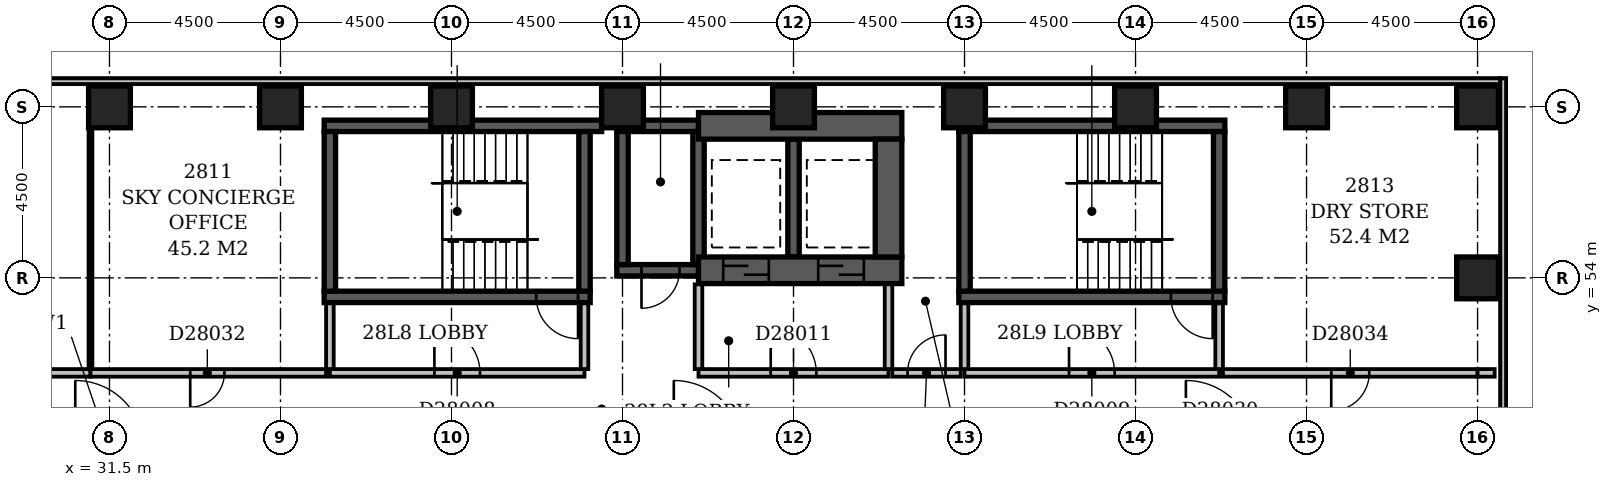
"""IFC4 building model, lengths in metres.
Left out: names, types, materials, properties, quantities, classifications, styles, units other than length and angle.
Written with IfcOpenShell. Run it as: python <this file> out.ifc"""

import sys

from ifc_helpers import new_model, si_unit, direction, frame, frame_2d, origin, origin_2d, place, context, subcontext, project, spatial, rectangle, extrude, element, fill, save


model = new_model("IFC4")
c1 = context("Model", 3, precision=1e-05, world=origin(), true_north=direction((0.0, 1.0)))
c2 = subcontext(c1, "Body", "Model", "MODEL_VIEW")
j1 = project(units=[si_unit("LENGTHUNIT", "METRE"), si_unit("PLANEANGLEUNIT", "RADIAN")], contexts=[c1])
p1 = place(None, origin())
s1 = spatial("IfcSite", under=j1, at=p1, CompositionType="ELEMENT")
p2 = place(p1, origin())
s2 = spatial("IfcBuilding", under=s1, at=p2, CompositionType="ELEMENT")
p3 = place(p2, frame((0.0, 0.0, 113.6)))
s3 = spatial("IfcBuildingStorey", under=s2, at=p3, CompositionType="ELEMENT", Elevation=113.6)
p4 = place(p3, frame((37.15, 53.5, -0.5), z_axis=(0.0, 0.0, 1.0), x_axis=(1.0, 0.0, 0.0)))
e1 = element("IfcWall", 1, at=p4, inside=s3, PredefinedType="SHEAR", context=c2, shape_type="SweptSolid", body=[
    extrude(rectangle(XDim=7.0, YDim=0.3, at=frame_2d((3.5, 0.0))), origin(), (0.0, 0.0, 1.0), 6.2),
])
p5 = place(p4, frame((5.58, 0.0, 0.5)))
e2 = element("IfcOpeningElement", 2, at=p5, cuts=e1, PredefinedType="OPENING", context=c2, shape_type="SweptSolid", body=[
    extrude(rectangle(XDim=1.1, YDim=2.1, at=frame_2d((0.55, 1.05))), frame((0.0, 0.162, 0.0), z_axis=(0.0, -1.0, 0.0), x_axis=(1.0, 0.0, 0.0)), (0.0, 0.0, 1.0), 0.324),
])
p6 = place(p3, frame((37.15, 58.0, -0.5), z_axis=(0.0, 0.0, 1.0), x_axis=(1.0, 0.0, 0.0)))
e3 = element("IfcWall", 3, at=p6, inside=s3, PredefinedType="SHEAR", context=c2, shape_type="SweptSolid", body=[
    extrude(rectangle(XDim=7.3, YDim=0.3, at=frame_2d((3.65, 0.0))), origin(), (0.0, 0.0, 1.0), 6.2),
])
for number, where, z_axis, x_axis in (
    (4, (37.3, 53.65, -0.5), (0.0, 0.0, 1.0), (0.0, 1.0, 0.0)),
    (5, (44.0, 53.65, -0.5), (0.0, 0.0, 1.0), (0.0, 1.0, 0.0)),
):
    element("IfcWall", number, at=place(p3, frame(where, z_axis=z_axis, x_axis=x_axis)), inside=s3, PredefinedType="SHEAR", context=c2, shape_type="SweptSolid", body=[
        extrude(rectangle(XDim=4.2, YDim=0.3, at=frame_2d((2.1, 0.0))), origin(), (0.0, 0.0, 1.0), 6.2),
    ])
p7 = place(p3, frame((44.85, 54.2, -0.5), z_axis=(0.0, 0.0, 1.0), x_axis=(1.0, 0.0, 0.0)))
e6 = element("IfcWall", 6, at=p7, inside=s3, PredefinedType="SHEAR", context=c2, shape_type="SweptSolid", body=[
    extrude(rectangle(XDim=2.15, YDim=0.3, at=frame_2d((1.075, 0.0))), origin(), (0.0, 0.0, 1.0), 6.2),
])
p8 = place(p7, frame((0.65, 0.0, 0.5)))
e7 = element("IfcOpeningElement", 7, at=p8, cuts=e6, PredefinedType="OPENING", context=c2, shape_type="SweptSolid", body=[
    extrude(rectangle(XDim=1.0, YDim=2.1, at=frame_2d((0.5, 1.05))), frame((0.0, 0.162, 0.0), z_axis=(0.0, -1.0, 0.0), x_axis=(1.0, 0.0, 0.0)), (0.0, 0.0, 1.0), 0.324),
])
p9 = place(p3, frame((44.85, 58.0, -0.5), z_axis=(0.0, 0.0, 1.0), x_axis=(1.0, 0.0, 0.0)))
e8 = element("IfcWall", 8, at=p9, inside=s3, PredefinedType="SHEAR", context=c2, shape_type="SweptSolid", body=[
    extrude(rectangle(XDim=2.15, YDim=0.3, at=frame_2d((1.075, 0.0))), origin(), (0.0, 0.0, 1.0), 6.2),
])
p10 = place(p3, frame((45.0, 54.35, -0.5), z_axis=(0.0, 0.0, 1.0), x_axis=(0.0, 1.0, 0.0)))
e9 = element("IfcWall", 9, at=p10, inside=s3, PredefinedType="SHEAR", context=c2, shape_type="SweptSolid", body=[
    extrude(rectangle(XDim=3.5, YDim=0.3, at=frame_2d((1.75, 0.0))), origin(), (0.0, 0.0, 1.0), 6.2),
])
p11 = place(p3, frame((47.0, 54.2, -0.5), z_axis=(0.0, 0.0, 1.0), x_axis=(1.0, 0.0, 0.0)))
e10 = element("IfcWall", 10, at=p11, inside=s3, PredefinedType="SHEAR", context=c2, shape_type="SweptSolid", body=[
    extrude(rectangle(XDim=5.35, YDim=0.7, at=frame_2d((2.675, 0.0))), origin(), (0.0, 0.0, 1.0), 6.2),
])
p12 = place(p11, frame((0.65, 0.0, 0.5)))
e11 = element("IfcOpeningElement", 11, at=p12, cuts=e10, PredefinedType="OPENING", context=c2, shape_type="SweptSolid", body=[
    extrude(rectangle(XDim=1.2, YDim=2.1, at=frame_2d((0.6, 1.05))), frame((0.0, 0.362, 0.0), z_axis=(0.0, -1.0, 0.0), x_axis=(1.0, 0.0, 0.0)), (0.0, 0.0, 1.0), 0.724),
])
p13 = place(p11, frame((3.15, 0.0, 0.5)))
e12 = element("IfcOpeningElement", 12, at=p13, cuts=e10, PredefinedType="OPENING", context=c2, shape_type="SweptSolid", body=[
    extrude(rectangle(XDim=1.2, YDim=2.1, at=frame_2d((0.6, 1.05))), frame((0.0, 0.362, 0.0), z_axis=(0.0, -1.0, 0.0), x_axis=(1.0, 0.0, 0.0)), (0.0, 0.0, 1.0), 0.724),
])
p14 = place(p3, frame((47.0, 54.35, -0.5), z_axis=(0.0, 0.0, 1.0), x_axis=(0.0, 1.0, 0.0)))
e13 = element("IfcWall", 13, at=p14, inside=s3, PredefinedType="SHEAR", context=c2, shape_type="SweptSolid", body=[
    extrude(rectangle(XDim=3.5, YDim=0.3, at=frame_2d((1.75, 0.0))), origin(), (0.0, 0.0, 1.0), 6.2),
])
p15 = place(p3, frame((47.0, 58.0, -0.5), z_axis=(0.0, 0.0, 1.0), x_axis=(1.0, 0.0, 0.0)))
e14 = element("IfcWall", 14, at=p15, inside=s3, PredefinedType="SHEAR", context=c2, shape_type="SweptSolid", body=[
    extrude(rectangle(XDim=5.35, YDim=0.7, at=frame_2d((2.675, 0.0))), origin(), (0.0, 0.0, 1.0), 6.2),
])
p16 = place(p3, frame((49.5, 54.55, -0.5), z_axis=(0.0, 0.0, 1.0), x_axis=(0.0, 1.0, 0.0)))
e15 = element("IfcWall", 15, at=p16, inside=s3, PredefinedType="SHEAR", context=c2, shape_type="SweptSolid", body=[
    extrude(rectangle(XDim=3.1, YDim=0.3, at=frame_2d((1.55, 0.0))), origin(), (0.0, 0.0, 1.0), 6.2),
])
p17 = place(p3, frame((52.0, 54.55, -0.5), z_axis=(0.0, 0.0, 1.0), x_axis=(0.0, 1.0, 0.0)))
e16 = element("IfcWall", 16, at=p17, inside=s3, PredefinedType="SHEAR", context=c2, shape_type="SweptSolid", body=[
    extrude(rectangle(XDim=3.1, YDim=0.7, at=frame_2d((1.55, 0.0))), origin(), (0.0, 0.0, 1.0), 6.2),
])
p18 = place(p3, frame((53.85, 53.5, -0.5), z_axis=(0.0, 0.0, 1.0), x_axis=(1.0, 0.0, 0.0)))
e17 = element("IfcWall", 17, at=p18, inside=s3, PredefinedType="SHEAR", context=c2, shape_type="SweptSolid", body=[
    extrude(rectangle(XDim=7.0, YDim=0.3, at=frame_2d((3.5, 0.0))), origin(), (0.0, 0.0, 1.0), 6.2),
])
p19 = place(p18, frame((5.58, 0.0, 0.5)))
e18 = element("IfcOpeningElement", 18, at=p19, cuts=e17, PredefinedType="OPENING", context=c2, shape_type="SweptSolid", body=[
    extrude(rectangle(XDim=1.1, YDim=2.1, at=frame_2d((0.55, 1.05))), frame((0.0, 0.162, 0.0), z_axis=(0.0, -1.0, 0.0), x_axis=(1.0, 0.0, 0.0)), (0.0, 0.0, 1.0), 0.324),
])
p20 = place(p3, frame((53.85, 58.0, -0.5), z_axis=(0.0, 0.0, 1.0), x_axis=(1.0, 0.0, 0.0)))
e19 = element("IfcWall", 19, at=p20, inside=s3, PredefinedType="SHEAR", context=c2, shape_type="SweptSolid", body=[
    extrude(rectangle(XDim=7.0, YDim=0.3, at=frame_2d((3.5, 0.0))), origin(), (0.0, 0.0, 1.0), 6.2),
])
for number, where, z_axis, x_axis in (
    (20, (54.0, 53.65, -0.5), (0.0, 0.0, 1.0), (0.0, 1.0, 0.0)),
    (21, (60.7, 53.65, -0.5), (0.0, 0.0, 1.0), (0.0, 1.0, 0.0)),
):
    element("IfcWall", number, at=place(p3, frame(where, z_axis=z_axis, x_axis=x_axis)), inside=s3, PredefinedType="SHEAR", context=c2, shape_type="SweptSolid", body=[
        extrude(rectangle(XDim=4.2, YDim=0.3, at=frame_2d((2.1, 0.0))), origin(), (0.0, 0.0, 1.0), 6.2),
    ])
for number, where, z_axis, x_axis in (
    (22, (67.5, 54.0, -0.5), (0.0, 0.0, 1.0), (1.0, 0.0, 0.0)),
    (23, (31.5, 58.5, -0.5), (0.0, 0.0, 1.0), (1.0, 0.0, 0.0)),
    (24, (36.0, 58.5, -0.5), (0.0, 0.0, 1.0), (1.0, 0.0, 0.0)),
    (25, (40.5, 58.5, -0.5), (0.0, 0.0, 1.0), (1.0, 0.0, 0.0)),
    (26, (45.0, 58.5, -0.5), (0.0, 0.0, 1.0), (1.0, 0.0, 0.0)),
    (27, (49.5, 58.5, -0.5), (0.0, 0.0, 1.0), (1.0, 0.0, 0.0)),
    (28, (54.0, 58.5, -0.5), (0.0, 0.0, 1.0), (1.0, 0.0, 0.0)),
    (29, (58.5, 58.5, -0.5), (0.0, 0.0, 1.0), (1.0, 0.0, 0.0)),
    (30, (63.0, 58.5, -0.5), (0.0, 0.0, 1.0), (1.0, 0.0, 0.0)),
    (31, (67.5, 58.5, -0.5), (0.0, 0.0, 1.0), (1.0, 0.0, 0.0)),
):
    element("IfcColumn", number, at=place(p3, frame(where, z_axis=z_axis, x_axis=x_axis)), inside=s3, PredefinedType="COLUMN", context=c2, shape_type="SweptSolid", body=[
        extrude(rectangle(XDim=1.1, YDim=1.1, at=origin_2d()), origin(), (0.0, 0.0, 1.0), 6.2),
    ])
p21 = place(p3, frame((68.175, 35.4, 0.0), z_axis=(0.0, 0.0, 1.0), x_axis=(0.0, 1.0, 0.0)))
e32 = element("IfcWall", 32, at=p21, inside=s3, PredefinedType="STANDARD", context=c2, shape_type="SweptSolid", body=[
    extrude(rectangle(XDim=23.85, YDim=0.15, at=frame_2d((11.925, 0.0))), origin(), (0.0, 0.0, 1.0), 1.1),
])
p22 = place(p3, frame((68.1, 59.175, 0.0), z_axis=(0.0, 0.0, 1.0), x_axis=(-1.0, 0.0, 0.0)))
e33 = element("IfcWall", 33, at=p22, inside=s3, PredefinedType="STANDARD", context=c2, shape_type="SweptSolid", body=[
    extrude(rectangle(XDim=68.85, YDim=0.15, at=frame_2d((34.425, 0.0))), origin(), (0.0, 0.0, 1.0), 1.1),
])
p23 = place(p3, frame((68.175, 46.887, 1.1), z_axis=(0.0, 0.0, 1.0), x_axis=(0.0, 1.0, 0.0)))
e34 = element("IfcWall", 34, at=p23, inside=s3, PredefinedType="STANDARD", context=c2, shape_type="SweptSolid", body=[
    extrude(rectangle(XDim=12.363, YDim=0.15, at=frame_2d((6.181, 0.0))), origin(), (0.0, 0.0, 1.0), 4.0),
])
p24 = place(p3, frame((68.1, 59.175, 1.1), z_axis=(0.0, 0.0, 1.0), x_axis=(-1.0, 0.0, 0.0)))
e35 = element("IfcWall", 35, at=p24, inside=s3, PredefinedType="STANDARD", context=c2, shape_type="SweptSolid", body=[
    extrude(rectangle(XDim=68.85, YDim=0.15, at=frame_2d((34.425, 0.0))), origin(), (0.0, 0.0, 1.0), 4.0),
])
p25 = place(p3, frame((47.0, 51.5, 0.0), z_axis=(0.0, 0.0, 1.0), x_axis=(1.0, 0.0, 0.0)))
e36 = element("IfcWall", 36, at=p25, inside=s3, PredefinedType="PARTITIONING", context=c2, shape_type="SweptSolid", body=[
    extrude(rectangle(XDim=5.0, YDim=0.2, at=frame_2d((2.5, 0.0))), origin(), (0.0, 0.0, 1.0), 5.7),
])
p26 = place(p25, frame((1.9, 0.0, 0.0)))
e37 = element("IfcOpeningElement", 37, at=p26, cuts=e36, PredefinedType="OPENING", context=c2, shape_type="SweptSolid", body=[
    extrude(rectangle(XDim=1.2, YDim=2.1, at=frame_2d((0.6, 1.05))), frame((0.0, 0.112, 0.0), z_axis=(0.0, -1.0, 0.0), x_axis=(1.0, 0.0, 0.0)), (0.0, 0.0, 1.0), 0.224),
])
for number, where, z_axis, x_axis in (
    (38, (52.0, 51.6, 0.0), (0.0, 0.0, 1.0), (0.0, 1.0, 0.0)),
    (39, (47.0, 51.6, 0.0), (0.0, 0.0, 1.0), (0.0, 1.0, 0.0)),
):
    element("IfcWall", number, at=place(p3, frame(where, z_axis=z_axis, x_axis=x_axis)), inside=s3, PredefinedType="PARTITIONING", context=c2, shape_type="SweptSolid", body=[
        extrude(rectangle(XDim=2.23, YDim=0.2, at=frame_2d((1.115, 0.0))), origin(), (0.0, 0.0, 1.0), 5.7),
    ])
p27 = place(p3, frame((37.3, 51.5, 0.0), z_axis=(0.0, 0.0, 1.0), x_axis=(1.0, 0.0, 0.0)))
e40 = element("IfcWall", 40, at=p27, inside=s3, PredefinedType="PARTITIONING", context=c2, shape_type="SweptSolid", body=[
    extrude(rectangle(XDim=6.7, YDim=0.2, at=frame_2d((3.35, 0.0))), origin(), (0.0, 0.0, 1.0), 5.7),
])
p28 = place(p27, frame((2.75, 0.0, 0.0)))
e41 = element("IfcOpeningElement", 41, at=p28, cuts=e40, PredefinedType="OPENING", context=c2, shape_type="SweptSolid", body=[
    extrude(rectangle(XDim=1.2, YDim=2.1, at=frame_2d((0.6, 1.05))), frame((0.0, 0.112, 0.0), z_axis=(0.0, -1.0, 0.0), x_axis=(1.0, 0.0, 0.0)), (0.0, 0.0, 1.0), 0.224),
])
for number, where, z_axis, x_axis in (
    (42, (44.0, 51.6, 0.0), (0.0, 0.0, 1.0), (0.0, 1.0, 0.0)),
    (43, (37.3, 51.6, 0.0), (0.0, 0.0, 1.0), (0.0, 1.0, 0.0)),
):
    element("IfcWall", number, at=place(p3, frame(where, z_axis=z_axis, x_axis=x_axis)), inside=s3, PredefinedType="PARTITIONING", context=c2, shape_type="SweptSolid", body=[
        extrude(rectangle(XDim=1.73, YDim=0.2, at=frame_2d((0.865, 0.0))), origin(), (0.0, 0.0, 1.0), 5.7),
    ])
p29 = place(p3, frame((54.0, 51.5, 0.0), z_axis=(0.0, 0.0, 1.0), x_axis=(1.0, 0.0, 0.0)))
e44 = element("IfcWall", 44, at=p29, inside=s3, PredefinedType="PARTITIONING", context=c2, shape_type="SweptSolid", body=[
    extrude(rectangle(XDim=6.7, YDim=0.2, at=frame_2d((3.35, 0.0))), origin(), (0.0, 0.0, 1.0), 5.7),
])
p30 = place(p29, frame((2.75, 0.0, 0.0)))
e45 = element("IfcOpeningElement", 45, at=p30, cuts=e44, PredefinedType="OPENING", context=c2, shape_type="SweptSolid", body=[
    extrude(rectangle(XDim=1.2, YDim=2.1, at=frame_2d((0.6, 1.05))), frame((0.0, 0.112, 0.0), z_axis=(0.0, -1.0, 0.0), x_axis=(1.0, 0.0, 0.0)), (0.0, 0.0, 1.0), 0.224),
])
p31 = place(p3, frame((60.7, 51.6, 0.0), z_axis=(0.0, 0.0, 1.0), x_axis=(0.0, 1.0, 0.0)))
e46 = element("IfcWall", 46, at=p31, inside=s3, PredefinedType="PARTITIONING", context=c2, shape_type="SweptSolid", body=[
    extrude(rectangle(XDim=1.73, YDim=0.2, at=frame_2d((0.865, 0.0))), origin(), (0.0, 0.0, 1.0), 5.7),
])
p32 = place(p3, frame((54.0, 51.6, 0.0), z_axis=(0.0, 0.0, 1.0), x_axis=(0.0, 1.0, 0.0)))
e47 = element("IfcWall", 47, at=p32, inside=s3, PredefinedType="PARTITIONING", context=c2, shape_type="SweptSolid", body=[
    extrude(rectangle(XDim=1.73, YDim=0.2, at=frame_2d((0.865, 0.0))), origin(), (0.0, 0.0, 1.0), 5.0),
])
p33 = place(p3, frame((31.0, 51.5, 0.0), z_axis=(0.0, 0.0, 1.0), x_axis=(-1.0, 0.0, 0.0)))
e48 = element("IfcWall", 48, at=p33, inside=s3, PredefinedType="PARTITIONING", context=c2, shape_type="SweptSolid", body=[
    extrude(rectangle(XDim=3.1, YDim=0.2, at=frame_2d((1.55, 0.0))), origin(), (0.0, 0.0, 1.0), 5.7),
])
p34 = place(p33, frame((1.125, 0.0, 0.0)))
e49 = element("IfcOpeningElement", 49, at=p34, cuts=e48, PredefinedType="OPENING", context=c2, shape_type="SweptSolid", body=[
    extrude(rectangle(XDim=0.8, YDim=2.1, at=frame_2d((0.4, 1.05))), frame((0.0, 0.112, 0.0), z_axis=(0.0, -1.0, 0.0), x_axis=(1.0, 0.0, 0.0)), (0.0, 0.0, 1.0), 0.224),
])
p35 = place(p3, frame((37.2, 51.5, 0.0), z_axis=(0.0, 0.0, 1.0), x_axis=(-1.0, 0.0, 0.0)))
e50 = element("IfcWall", 50, at=p35, inside=s3, PredefinedType="PARTITIONING", context=c2, shape_type="SweptSolid", body=[
    extrude(rectangle(XDim=6.2, YDim=0.2, at=frame_2d((3.1, 0.0))), origin(), (0.0, 0.0, 1.0), 5.7),
])
p36 = place(p35, frame((2.675, 0.0, 0.0)))
e51 = element("IfcOpeningElement", 51, at=p36, cuts=e50, PredefinedType="OPENING", context=c2, shape_type="SweptSolid", body=[
    extrude(rectangle(XDim=0.9, YDim=2.1, at=frame_2d((0.45, 1.05))), frame((0.0, 0.112, 0.0), z_axis=(0.0, -1.0, 0.0), x_axis=(1.0, 0.0, 0.0)), (0.0, 0.0, 1.0), 0.224),
])
p37 = place(p3, frame((53.9, 51.5, 0.0), z_axis=(0.0, 0.0, 1.0), x_axis=(-1.0, 0.0, 0.0)))
e52 = element("IfcWall", 52, at=p37, inside=s3, PredefinedType="PARTITIONING", context=c2, shape_type="SweptSolid", body=[
    extrude(rectangle(XDim=1.8, YDim=0.2, at=frame_2d((0.9, 0.0))), origin(), (0.0, 0.0, 1.0), 5.7),
])
p38 = place(p37, frame((0.4, 0.0, 0.0)))
e53 = element("IfcOpeningElement", 53, at=p38, cuts=e52, PredefinedType="OPENING", context=c2, shape_type="SweptSolid", body=[
    extrude(rectangle(XDim=1.0, YDim=2.1, at=frame_2d((0.5, 1.05))), frame((0.0, 0.112, 0.0), z_axis=(0.0, -1.0, 0.0), x_axis=(1.0, 0.0, 0.0)), (0.0, 0.0, 1.0), 0.224),
])
p39 = place(p3, frame((67.5, 51.5, 0.0), z_axis=(0.0, 0.0, 1.0), x_axis=(-1.0, 0.0, 0.0)))
e54 = element("IfcWall", 54, at=p39, inside=s3, PredefinedType="PARTITIONING", context=c2, shape_type="SweptSolid", body=[
    extrude(rectangle(XDim=6.7, YDim=0.2, at=frame_2d((3.35, 0.0))), origin(), (0.0, 0.0, 1.0), 5.7),
])
p40 = place(p39, frame((2.85, 0.0, 0.0)))
e55 = element("IfcOpeningElement", 55, at=p40, cuts=e54, PredefinedType="OPENING", context=c2, shape_type="SweptSolid", body=[
    extrude(rectangle(XDim=1.0, YDim=2.1, at=frame_2d((0.5, 1.05))), frame((0.0, 0.112, 0.0), z_axis=(0.0, -1.0, 0.0), x_axis=(1.0, 0.0, 0.0)), (0.0, 0.0, 1.0), 0.224),
])
p41 = place(p3, frame((67.95, 51.5, 0.0), z_axis=(0.0, 0.0, 1.0), x_axis=(-1.0, 0.0, 0.0)))
e56 = element("IfcWall", 56, at=p41, inside=s3, PredefinedType="PARTITIONING", context=c2, shape_type="SweptSolid", body=[
    extrude(rectangle(XDim=0.45, YDim=0.2, at=frame_2d((0.225, 0.0))), origin(), (0.0, 0.0, 1.0), 5.7),
])
p42 = place(p3, frame((31.0, 58.5, 0.0), z_axis=(0.0, 0.0, 1.0), x_axis=(0.0, -1.0, 0.0)))
e57 = element("IfcWall", 57, at=p42, inside=s3, PredefinedType="PARTITIONING", context=c2, shape_type="SweptSolid", body=[
    extrude(rectangle(XDim=6.9, YDim=0.1, at=frame_2d((3.45, 0.0))), origin(), (0.0, 0.0, 1.0), 5.7),
])
p43 = place(p28, origin())
e58 = element("IfcDoor", 58, at=p43, inside=s3, OperationType="SINGLE_SWING_LEFT", PredefinedType="DOOR", context=c2, shape_type="SweptSolid", body=[
    extrude(rectangle(XDim=1.2, YDim=2.1, at=frame_2d((0.6, 1.05))), frame((0.0, 0.025, 0.0), z_axis=(0.0, -1.0, 0.0), x_axis=(1.0, 0.0, 0.0)), (0.0, 0.0, 1.0), 0.05),
])
fill(e41, e58)
p44 = place(p30, origin())
e59 = element("IfcDoor", 59, at=p44, inside=s3, OperationType="SINGLE_SWING_LEFT", PredefinedType="DOOR", context=c2, shape_type="SweptSolid", body=[
    extrude(rectangle(XDim=1.2, YDim=2.1, at=frame_2d((0.6, 1.05))), frame((0.0, 0.025, 0.0), z_axis=(0.0, -1.0, 0.0), x_axis=(1.0, 0.0, 0.0)), (0.0, 0.0, 1.0), 0.05),
])
fill(e45, e59)
p45 = place(p12, origin())
e60 = element("IfcDoor", 60, at=p45, inside=s3, OperationType="SLIDING_TO_LEFT", PredefinedType="DOOR", context=c2, shape_type="SweptSolid", body=[
    extrude(rectangle(XDim=1.2, YDim=2.1, at=frame_2d((0.6, 1.05))), frame((0.0, 0.025, 0.0), z_axis=(0.0, -1.0, 0.0), x_axis=(1.0, 0.0, 0.0)), (0.0, 0.0, 1.0), 0.05),
])
fill(e11, e60)
p46 = place(p13, origin())
e61 = element("IfcDoor", 61, at=p46, inside=s3, OperationType="SLIDING_TO_LEFT", PredefinedType="DOOR", context=c2, shape_type="SweptSolid", body=[
    extrude(rectangle(XDim=1.2, YDim=2.1, at=frame_2d((0.6, 1.05))), frame((0.0, 0.025, 0.0), z_axis=(0.0, -1.0, 0.0), x_axis=(1.0, 0.0, 0.0)), (0.0, 0.0, 1.0), 0.05),
])
fill(e12, e61)
p47 = place(p26, origin())
e62 = element("IfcDoor", 62, at=p47, inside=s3, OperationType="SINGLE_SWING_LEFT", PredefinedType="DOOR", context=c2, shape_type="SweptSolid", body=[
    extrude(rectangle(XDim=1.2, YDim=2.1, at=frame_2d((0.6, 1.05))), frame((0.0, 0.025, 0.0), z_axis=(0.0, -1.0, 0.0), x_axis=(1.0, 0.0, 0.0)), (0.0, 0.0, 1.0), 0.05),
])
fill(e37, e62)
p48 = place(p8, frame((1.0, 0.0, 0.0), z_axis=(0.0, 0.0, 1.0), x_axis=(-1.0, 0.0, 0.0)))
e63 = element("IfcDoor", 63, at=p48, inside=s3, OperationType="SINGLE_SWING_RIGHT", PredefinedType="DOOR", context=c2, shape_type="SweptSolid", body=[
    extrude(rectangle(XDim=1.0, YDim=2.1, at=frame_2d((0.5, 1.05))), frame((0.0, 0.025, 0.0), z_axis=(0.0, -1.0, 0.0), x_axis=(1.0, 0.0, 0.0)), (0.0, 0.0, 1.0), 0.05),
])
fill(e7, e63)
p49 = place(p5, origin())
e64 = element("IfcDoor", 64, at=p49, inside=s3, OperationType="SINGLE_SWING_RIGHT", PredefinedType="DOOR", context=c2, shape_type="SweptSolid", body=[
    extrude(rectangle(XDim=1.1, YDim=2.1, at=frame_2d((0.55, 1.05))), frame((0.0, 0.025, 0.0), z_axis=(0.0, -1.0, 0.0), x_axis=(1.0, 0.0, 0.0)), (0.0, 0.0, 1.0), 0.05),
])
fill(e2, e64)
p50 = place(p19, origin())
e65 = element("IfcDoor", 65, at=p50, inside=s3, OperationType="SINGLE_SWING_RIGHT", PredefinedType="DOOR", context=c2, shape_type="SweptSolid", body=[
    extrude(rectangle(XDim=1.1, YDim=2.1, at=frame_2d((0.55, 1.05))), frame((0.0, 0.025, 0.0), z_axis=(0.0, -1.0, 0.0), x_axis=(1.0, 0.0, 0.0)), (0.0, 0.0, 1.0), 0.05),
])
fill(e18, e65)
p51 = place(p36, frame((0.9, 0.0, 0.0), z_axis=(0.0, 0.0, 1.0), x_axis=(-1.0, 0.0, 0.0)))
e66 = element("IfcDoor", 66, at=p51, inside=s3, OperationType="SINGLE_SWING_LEFT", PredefinedType="DOOR", context=c2, shape_type="SweptSolid", body=[
    extrude(rectangle(XDim=0.9, YDim=2.1, at=frame_2d((0.45, 1.05))), frame((0.0, 0.025, 0.0), z_axis=(0.0, -1.0, 0.0), x_axis=(1.0, 0.0, 0.0)), (0.0, 0.0, 1.0), 0.05),
])
fill(e51, e66)
p52 = place(p38, frame((1.0, 0.0, 0.0), z_axis=(0.0, 0.0, 1.0), x_axis=(-1.0, 0.0, 0.0)))
e67 = element("IfcDoor", 67, at=p52, inside=s3, OperationType="SINGLE_SWING_RIGHT", PredefinedType="DOOR", context=c2, shape_type="SweptSolid", body=[
    extrude(rectangle(XDim=1.0, YDim=2.1, at=frame_2d((0.5, 1.05))), frame((0.0, 0.025, 0.0), z_axis=(0.0, -1.0, 0.0), x_axis=(1.0, 0.0, 0.0)), (0.0, 0.0, 1.0), 0.05),
])
fill(e53, e67)
p53 = place(p40, frame((1.0, 0.0, 0.0), z_axis=(0.0, 0.0, 1.0), x_axis=(-1.0, 0.0, 0.0)))
e68 = element("IfcDoor", 68, at=p53, inside=s3, OperationType="SINGLE_SWING_LEFT", PredefinedType="DOOR", context=c2, shape_type="SweptSolid", body=[
    extrude(rectangle(XDim=1.0, YDim=2.1, at=frame_2d((0.5, 1.05))), frame((0.0, 0.025, 0.0), z_axis=(0.0, -1.0, 0.0), x_axis=(1.0, 0.0, 0.0)), (0.0, 0.0, 1.0), 0.05),
])
fill(e55, e68)
save(model, sys.argv[1])
